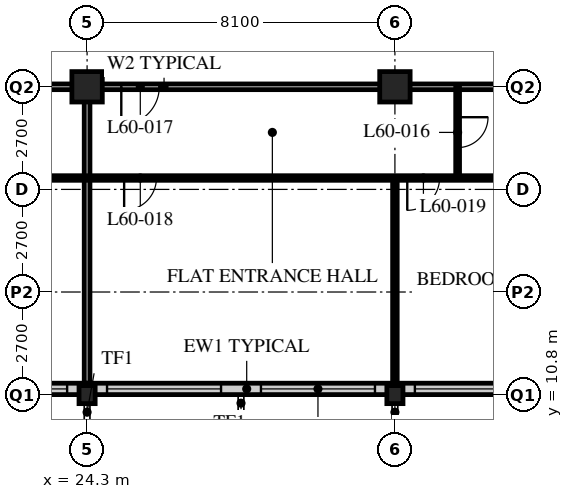
"""IFC4 building model, lengths in metres.
Left out: names, types, materials, properties, quantities, classifications, styles, units other than length and angle.
Written with IfcOpenShell. Run it as: python <this file> out.ifc"""

import sys

from ifc_helpers import new_model, si_unit, direction, frame, frame_2d, origin, origin_2d, place, context, subcontext, project, spatial, rectangle, hollow_rectangle, i_section, extrude, element, fill, save


model = new_model("IFC4")
c1 = context("Model", 3, precision=1e-05, world=origin(), true_north=direction((0.0, 1.0)))
c2 = subcontext(c1, "Body", "Model", "MODEL_VIEW")
j1 = project(units=[si_unit("LENGTHUNIT", "METRE"), si_unit("PLANEANGLEUNIT", "RADIAN")], contexts=[c1])
p1 = place(None, origin())
s1 = spatial("IfcSite", under=j1, at=p1, CompositionType="ELEMENT")
p2 = place(p1, origin())
s2 = spatial("IfcBuilding", under=s1, at=p2, CompositionType="ELEMENT")
p3 = place(p2, frame((0.0, 0.0, 231.6)))
s3 = spatial("IfcBuildingStorey", under=s2, at=p3, CompositionType="ELEMENT", Elevation=231.6)
p4 = place(p3, frame((24.3, 10.8, 0.0), z_axis=(0.0, 0.0, 1.0), x_axis=(1.0, 0.0, 0.0)))
e1 = element("IfcColumn", 1, at=p4, inside=s3, PredefinedType="COLUMN", context=c2, shape_type="SweptSolid", body=[
    extrude(i_section(OverallWidth=0.424, OverallDepth=0.475, WebThickness=0.048, FlangeThickness=0.077, FilletRadius=0.015, at=origin_2d()), origin(), (0.0, 0.0, 1.0), 3.6),
])
p5 = place(p3, frame((24.3, 18.9, 0.0), z_axis=(0.0, 0.0, 1.0), x_axis=(1.0, 0.0, 0.0)))
e2 = element("IfcColumn", 2, at=p5, inside=s3, PredefinedType="COLUMN", context=c2, shape_type="SweptSolid", body=[
    extrude(hollow_rectangle(XDim=0.8, YDim=0.8, WallThickness=0.08, at=origin_2d()), origin(), (0.0, 0.0, 1.0), 3.6),
])
p6 = place(p3, frame((32.4, 10.8, 0.0), z_axis=(0.0, 0.0, 1.0), x_axis=(1.0, 0.0, 0.0)))
e3 = element("IfcColumn", 3, at=p6, inside=s3, PredefinedType="COLUMN", context=c2, shape_type="SweptSolid", body=[
    extrude(i_section(OverallWidth=0.424, OverallDepth=0.475, WebThickness=0.048, FlangeThickness=0.077, FilletRadius=0.015, at=origin_2d()), origin(), (0.0, 0.0, 1.0), 3.6),
])
p7 = place(p3, frame((32.4, 18.9, 0.0), z_axis=(0.0, 0.0, 1.0), x_axis=(1.0, 0.0, 0.0)))
e4 = element("IfcColumn", 4, at=p7, inside=s3, PredefinedType="COLUMN", context=c2, shape_type="SweptSolid", body=[
    extrude(hollow_rectangle(XDim=0.8, YDim=0.8, WallThickness=0.08, at=origin_2d()), origin(), (0.0, 0.0, 1.0), 3.6),
])
p8 = place(p3, frame((8.4, 10.95, 0.0), z_axis=(0.0, 0.0, 1.0), x_axis=(1.0, 0.0, 0.0)))
e5 = element("IfcWall", 5, at=p8, inside=s3, PredefinedType="SOLIDWALL", context=c2, shape_type="SweptSolid", body=[
    extrude(rectangle(XDim=40.2, YDim=0.3, at=frame_2d((20.1, 0.0))), origin(), (0.0, 0.0, 1.0), 2.35),
])
p9 = place(p8, frame((0.225, 0.0, 0.6)))
e6 = element("IfcOpeningElement", 6, at=p9, cuts=e5, PredefinedType="OPENING", context=c2, shape_type="SweptSolid", body=[
    extrude(rectangle(XDim=3.0, YDim=1.7, at=frame_2d((1.5, 0.85))), frame((0.0, 0.16, 0.0), z_axis=(0.0, -1.0, 0.0), x_axis=(1.0, 0.0, 0.0)), (0.0, 0.0, 1.0), 0.32),
])
p10 = place(p8, frame((4.275, 0.0, 0.6)))
e7 = element("IfcOpeningElement", 7, at=p10, cuts=e5, PredefinedType="OPENING", context=c2, shape_type="SweptSolid", body=[
    extrude(rectangle(XDim=3.0, YDim=1.7, at=frame_2d((1.5, 0.85))), frame((0.0, 0.16, 0.0), z_axis=(0.0, -1.0, 0.0), x_axis=(1.0, 0.0, 0.0)), (0.0, 0.0, 1.0), 0.32),
])
p11 = place(p8, frame((8.325, 0.0, 0.6)))
e8 = element("IfcOpeningElement", 8, at=p11, cuts=e5, PredefinedType="OPENING", context=c2, shape_type="SweptSolid", body=[
    extrude(rectangle(XDim=3.0, YDim=1.7, at=frame_2d((1.5, 0.85))), frame((0.0, 0.16, 0.0), z_axis=(0.0, -1.0, 0.0), x_axis=(1.0, 0.0, 0.0)), (0.0, 0.0, 1.0), 0.32),
])
p12 = place(p8, frame((12.375, 0.0, 0.6)))
e9 = element("IfcOpeningElement", 9, at=p12, cuts=e5, PredefinedType="OPENING", context=c2, shape_type="SweptSolid", body=[
    extrude(rectangle(XDim=3.0, YDim=1.7, at=frame_2d((1.5, 0.85))), frame((0.0, 0.16, 0.0), z_axis=(0.0, -1.0, 0.0), x_axis=(1.0, 0.0, 0.0)), (0.0, 0.0, 1.0), 0.32),
])
p13 = place(p8, frame((16.425, 0.0, 0.6)))
e10 = element("IfcOpeningElement", 10, at=p13, cuts=e5, PredefinedType="OPENING", context=c2, shape_type="SweptSolid", body=[
    extrude(rectangle(XDim=3.0, YDim=1.7, at=frame_2d((1.5, 0.85))), frame((0.0, 0.16, 0.0), z_axis=(0.0, -1.0, 0.0), x_axis=(1.0, 0.0, 0.0)), (0.0, 0.0, 1.0), 0.32),
])
p14 = place(p8, frame((20.475, 0.0, 0.6)))
e11 = element("IfcOpeningElement", 11, at=p14, cuts=e5, PredefinedType="OPENING", context=c2, shape_type="SweptSolid", body=[
    extrude(rectangle(XDim=3.0, YDim=1.7, at=frame_2d((1.5, 0.85))), frame((0.0, 0.16, 0.0), z_axis=(0.0, -1.0, 0.0), x_axis=(1.0, 0.0, 0.0)), (0.0, 0.0, 1.0), 0.32),
])
p15 = place(p8, frame((24.525, 0.0, 0.6)))
e12 = element("IfcOpeningElement", 12, at=p15, cuts=e5, PredefinedType="OPENING", context=c2, shape_type="SweptSolid", body=[
    extrude(rectangle(XDim=3.0, YDim=1.7, at=frame_2d((1.5, 0.85))), frame((0.0, 0.16, 0.0), z_axis=(0.0, -1.0, 0.0), x_axis=(1.0, 0.0, 0.0)), (0.0, 0.0, 1.0), 0.32),
])
p16 = place(p8, frame((28.575, 0.0, 0.6)))
e13 = element("IfcOpeningElement", 13, at=p16, cuts=e5, PredefinedType="OPENING", context=c2, shape_type="SweptSolid", body=[
    extrude(rectangle(XDim=3.0, YDim=1.7, at=frame_2d((1.5, 0.85))), frame((0.0, 0.16, 0.0), z_axis=(0.0, -1.0, 0.0), x_axis=(1.0, 0.0, 0.0)), (0.0, 0.0, 1.0), 0.32),
])
p17 = place(p8, frame((32.625, 0.0, 0.6)))
e14 = element("IfcOpeningElement", 14, at=p17, cuts=e5, PredefinedType="OPENING", context=c2, shape_type="SweptSolid", body=[
    extrude(rectangle(XDim=3.0, YDim=1.7, at=frame_2d((1.5, 0.85))), frame((0.0, 0.16, 0.0), z_axis=(0.0, -1.0, 0.0), x_axis=(1.0, 0.0, 0.0)), (0.0, 0.0, 1.0), 0.32),
])
p18 = place(p8, frame((36.675, 0.0, 0.6)))
e15 = element("IfcOpeningElement", 15, at=p18, cuts=e5, PredefinedType="OPENING", context=c2, shape_type="SweptSolid", body=[
    extrude(rectangle(XDim=3.0, YDim=1.7, at=frame_2d((1.5, 0.85))), frame((0.0, 0.16, 0.0), z_axis=(0.0, -1.0, 0.0), x_axis=(1.0, 0.0, 0.0)), (0.0, 0.0, 1.0), 0.32),
])
p19 = place(p3, frame((8.1, 18.9, 0.0), z_axis=(0.0, 0.0, 1.0), x_axis=(1.0, 0.0, 0.0)))
e16 = element("IfcWall", 16, at=p19, inside=s3, PredefinedType="PARTITIONING", context=c2, shape_type="SweptSolid", body=[
    extrude(rectangle(XDim=36.45, YDim=0.15, at=frame_2d((18.225, 0.0))), origin(), (0.0, 0.0, 1.0), 2.35),
])
p20 = place(p19, frame((4.45, 0.0, 0.0)))
e17 = element("IfcOpeningElement", 17, at=p20, cuts=e16, PredefinedType="OPENING", context=c2, shape_type="SweptSolid", body=[
    extrude(rectangle(XDim=1.0, YDim=2.1, at=frame_2d((0.5, 1.05))), frame((0.0, 0.085, 0.0), z_axis=(0.0, -1.0, 0.0), x_axis=(1.0, 0.0, 0.0)), (0.0, 0.0, 1.0), 0.17),
])
p21 = place(p19, frame((17.1, 0.0, 0.0)))
e18 = element("IfcOpeningElement", 18, at=p21, cuts=e16, PredefinedType="OPENING", context=c2, shape_type="SweptSolid", body=[
    extrude(rectangle(XDim=1.0, YDim=2.1, at=frame_2d((0.5, 1.05))), frame((0.0, 0.085, 0.0), z_axis=(0.0, -1.0, 0.0), x_axis=(1.0, 0.0, 0.0)), (0.0, 0.0, 1.0), 0.17),
])
p22 = place(p19, frame((29.05, 0.0, 0.0)))
e19 = element("IfcOpeningElement", 19, at=p22, cuts=e16, PredefinedType="OPENING", context=c2, shape_type="SweptSolid", body=[
    extrude(rectangle(XDim=1.0, YDim=2.1, at=frame_2d((0.5, 1.05))), frame((0.0, 0.085, 0.0), z_axis=(0.0, -1.0, 0.0), x_axis=(1.0, 0.0, 0.0)), (0.0, 0.0, 1.0), 0.17),
])
p23 = place(p19, frame((2.625, 0.0, 0.0)))
e20 = element("IfcOpeningElement", 20, at=p23, cuts=e16, PredefinedType="OPENING", context=c2, shape_type="SweptSolid", body=[
    extrude(rectangle(XDim=1.0, YDim=2.1, at=frame_2d((0.5, 1.05))), frame((0.0, 0.085, 0.0), z_axis=(0.0, -1.0, 0.0), x_axis=(1.0, 0.0, 0.0)), (0.0, 0.0, 1.0), 0.17),
])
p24 = place(p19, frame((33.925, 0.0, 0.0)))
e21 = element("IfcOpeningElement", 21, at=p24, cuts=e16, PredefinedType="OPENING", context=c2, shape_type="SweptSolid", body=[
    extrude(rectangle(XDim=1.0, YDim=2.1, at=frame_2d((0.5, 1.05))), frame((0.0, 0.085, 0.0), z_axis=(0.0, -1.0, 0.0), x_axis=(1.0, 0.0, 0.0)), (0.0, 0.0, 1.0), 0.17),
])
p25 = place(p3, frame((24.3, 18.9, 0.0), z_axis=(0.0, 0.0, 1.0), x_axis=(0.0, -1.0, 0.0)))
e22 = element("IfcWall", 22, at=p25, inside=s3, PredefinedType="PARTITIONING", context=c2, shape_type="SweptSolid", body=[
    extrude(rectangle(XDim=7.8, YDim=0.15, at=frame_2d((3.9, 0.0))), origin(), (0.0, 0.0, 1.0), 2.35),
])
p26 = place(p3, frame((34.05, 18.9, 0.0), z_axis=(0.0, 0.0, 1.0), x_axis=(0.0, -1.0, 0.0)))
e23 = element("IfcWall", 23, at=p26, inside=s3, PredefinedType="PARTITIONING", context=c2, shape_type="SweptSolid", body=[
    extrude(rectangle(XDim=2.4, YDim=0.1, at=frame_2d((1.2, 0.0))), origin(), (0.0, 0.0, 1.0), 3.35),
])
p27 = place(p26, frame((0.8, 0.0, 0.0)))
e24 = element("IfcOpeningElement", 24, at=p27, cuts=e23, PredefinedType="OPENING", context=c2, shape_type="SweptSolid", body=[
    extrude(rectangle(XDim=0.8, YDim=2.1, at=frame_2d((0.4, 1.05))), frame((0.0, 0.06, 0.0), z_axis=(0.0, -1.0, 0.0), x_axis=(1.0, 0.0, 0.0)), (0.0, 0.0, 1.0), 0.12),
])
p28 = place(p3, frame((32.4, 16.5, 0.0), z_axis=(0.0, 0.0, 1.0), x_axis=(0.0, -1.0, 0.0)))
e25 = element("IfcWall", 25, at=p28, inside=s3, PredefinedType="PARTITIONING", context=c2, shape_type="SweptSolid", body=[
    extrude(rectangle(XDim=5.4, YDim=0.12, at=frame_2d((2.7, 0.0))), origin(), (0.0, 0.0, 1.0), 2.35),
])
p29 = place(p3, frame((8.1, 16.5, 0.0), z_axis=(0.0, 0.0, 1.0), x_axis=(1.0, 0.0, 0.0)))
e26 = element("IfcWall", 26, at=p29, inside=s3, PredefinedType="PARTITIONING", context=c2, shape_type="SweptSolid", body=[
    extrude(rectangle(XDim=28.35, YDim=0.12, at=frame_2d((14.175, 0.0))), origin(), (0.0, 0.0, 1.0), 3.35),
])
p30 = place(p29, frame((5.025, 0.0, 0.0)))
e27 = element("IfcOpeningElement", 27, at=p30, cuts=e26, PredefinedType="OPENING", context=c2, shape_type="SweptSolid", body=[
    extrude(rectangle(XDim=0.85, YDim=2.1, at=frame_2d((0.425, 1.05))), frame((0.0, 0.07, 0.0), z_axis=(0.0, -1.0, 0.0), x_axis=(1.0, 0.0, 0.0)), (0.0, 0.0, 1.0), 0.14),
])
p31 = place(p29, frame((12.475, 0.0, 0.0)))
e28 = element("IfcOpeningElement", 28, at=p31, cuts=e26, PredefinedType="OPENING", context=c2, shape_type="SweptSolid", body=[
    extrude(rectangle(XDim=0.85, YDim=2.1, at=frame_2d((0.425, 1.05))), frame((0.0, 0.07, 0.0), z_axis=(0.0, -1.0, 0.0), x_axis=(1.0, 0.0, 0.0)), (0.0, 0.0, 1.0), 0.14),
])
p32 = place(p29, frame((17.175, 0.0, 0.0)))
e29 = element("IfcOpeningElement", 29, at=p32, cuts=e26, PredefinedType="OPENING", context=c2, shape_type="SweptSolid", body=[
    extrude(rectangle(XDim=0.85, YDim=2.1, at=frame_2d((0.425, 1.05))), frame((0.0, 0.07, 0.0), z_axis=(0.0, -1.0, 0.0), x_axis=(1.0, 0.0, 0.0)), (0.0, 0.0, 1.0), 0.14),
])
p33 = place(p29, frame((24.625, 0.0, 0.0)))
e30 = element("IfcOpeningElement", 30, at=p33, cuts=e26, PredefinedType="OPENING", context=c2, shape_type="SweptSolid", body=[
    extrude(rectangle(XDim=0.85, YDim=2.1, at=frame_2d((0.425, 1.05))), frame((0.0, 0.07, 0.0), z_axis=(0.0, -1.0, 0.0), x_axis=(1.0, 0.0, 0.0)), (0.0, 0.0, 1.0), 0.14),
])
p34 = place(p29, frame((2.725, 0.0, 0.0)))
e31 = element("IfcOpeningElement", 31, at=p34, cuts=e26, PredefinedType="OPENING", context=c2, shape_type="SweptSolid", body=[
    extrude(rectangle(XDim=0.85, YDim=2.1, at=frame_2d((0.425, 1.05))), frame((0.0, 0.07, 0.0), z_axis=(0.0, -1.0, 0.0), x_axis=(1.0, 0.0, 0.0)), (0.0, 0.0, 1.0), 0.14),
])
p35 = place(p12, origin())
e32 = element("IfcWindow", 32, at=p35, inside=s3, PartitioningType="SINGLE_PANEL", PredefinedType="WINDOW", context=c2, shape_type="SweptSolid", body=[
    extrude(rectangle(XDim=3.0, YDim=1.7, at=frame_2d((1.5, 0.85))), frame((0.0, 0.03, 0.0), z_axis=(0.0, -1.0, 0.0), x_axis=(1.0, 0.0, 0.0)), (0.0, 0.0, 1.0), 0.06),
])
fill(e9, e32)
p36 = place(p13, origin())
e33 = element("IfcWindow", 33, at=p36, inside=s3, PartitioningType="SINGLE_PANEL", PredefinedType="WINDOW", context=c2, shape_type="SweptSolid", body=[
    extrude(rectangle(XDim=3.0, YDim=1.7, at=frame_2d((1.5, 0.85))), frame((0.0, 0.03, 0.0), z_axis=(0.0, -1.0, 0.0), x_axis=(1.0, 0.0, 0.0)), (0.0, 0.0, 1.0), 0.06),
])
fill(e10, e33)
p37 = place(p14, origin())
e34 = element("IfcWindow", 34, at=p37, inside=s3, PartitioningType="SINGLE_PANEL", PredefinedType="WINDOW", context=c2, shape_type="SweptSolid", body=[
    extrude(rectangle(XDim=3.0, YDim=1.7, at=frame_2d((1.5, 0.85))), frame((0.0, 0.03, 0.0), z_axis=(0.0, -1.0, 0.0), x_axis=(1.0, 0.0, 0.0)), (0.0, 0.0, 1.0), 0.06),
])
fill(e11, e34)
p38 = place(p15, origin())
e35 = element("IfcWindow", 35, at=p38, inside=s3, PartitioningType="SINGLE_PANEL", PredefinedType="WINDOW", context=c2, shape_type="SweptSolid", body=[
    extrude(rectangle(XDim=3.0, YDim=1.7, at=frame_2d((1.5, 0.85))), frame((0.0, 0.03, 0.0), z_axis=(0.0, -1.0, 0.0), x_axis=(1.0, 0.0, 0.0)), (0.0, 0.0, 1.0), 0.06),
])
fill(e12, e35)
p39 = place(p27, origin())
e36 = element("IfcDoor", 36, at=p39, inside=s3, OperationType="SINGLE_SWING_LEFT", PredefinedType="DOOR", context=c2, shape_type="SweptSolid", body=[
    extrude(rectangle(XDim=0.8, YDim=2.1, at=frame_2d((0.4, 1.05))), frame((0.0, 0.025, 0.0), z_axis=(0.0, -1.0, 0.0), x_axis=(1.0, 0.0, 0.0)), (0.0, 0.0, 1.0), 0.05),
])
fill(e24, e36)
p40 = place(p21, origin())
e37 = element("IfcDoor", 37, at=p40, inside=s3, OperationType="SINGLE_SWING_RIGHT", PredefinedType="DOOR", context=c2, shape_type="SweptSolid", body=[
    extrude(rectangle(XDim=1.0, YDim=2.1, at=frame_2d((0.5, 1.05))), frame((0.0, 0.025, 0.0), z_axis=(0.0, -1.0, 0.0), x_axis=(1.0, 0.0, 0.0)), (0.0, 0.0, 1.0), 0.05),
])
fill(e18, e37)
p41 = place(p32, origin())
e38 = element("IfcDoor", 38, at=p41, inside=s3, OperationType="SINGLE_SWING_RIGHT", PredefinedType="DOOR", context=c2, shape_type="SweptSolid", body=[
    extrude(rectangle(XDim=0.85, YDim=2.1, at=frame_2d((0.425, 1.05))), frame((0.0, 0.025, 0.0), z_axis=(0.0, -1.0, 0.0), x_axis=(1.0, 0.0, 0.0)), (0.0, 0.0, 1.0), 0.05),
])
fill(e29, e38)
p42 = place(p33, origin())
e39 = element("IfcDoor", 39, at=p42, inside=s3, OperationType="SINGLE_SWING_RIGHT", PredefinedType="DOOR", context=c2, shape_type="SweptSolid", body=[
    extrude(rectangle(XDim=0.85, YDim=2.1, at=frame_2d((0.425, 1.05))), frame((0.0, 0.025, 0.0), z_axis=(0.0, -1.0, 0.0), x_axis=(1.0, 0.0, 0.0)), (0.0, 0.0, 1.0), 0.05),
])
fill(e30, e39)
save(model, sys.argv[1])
